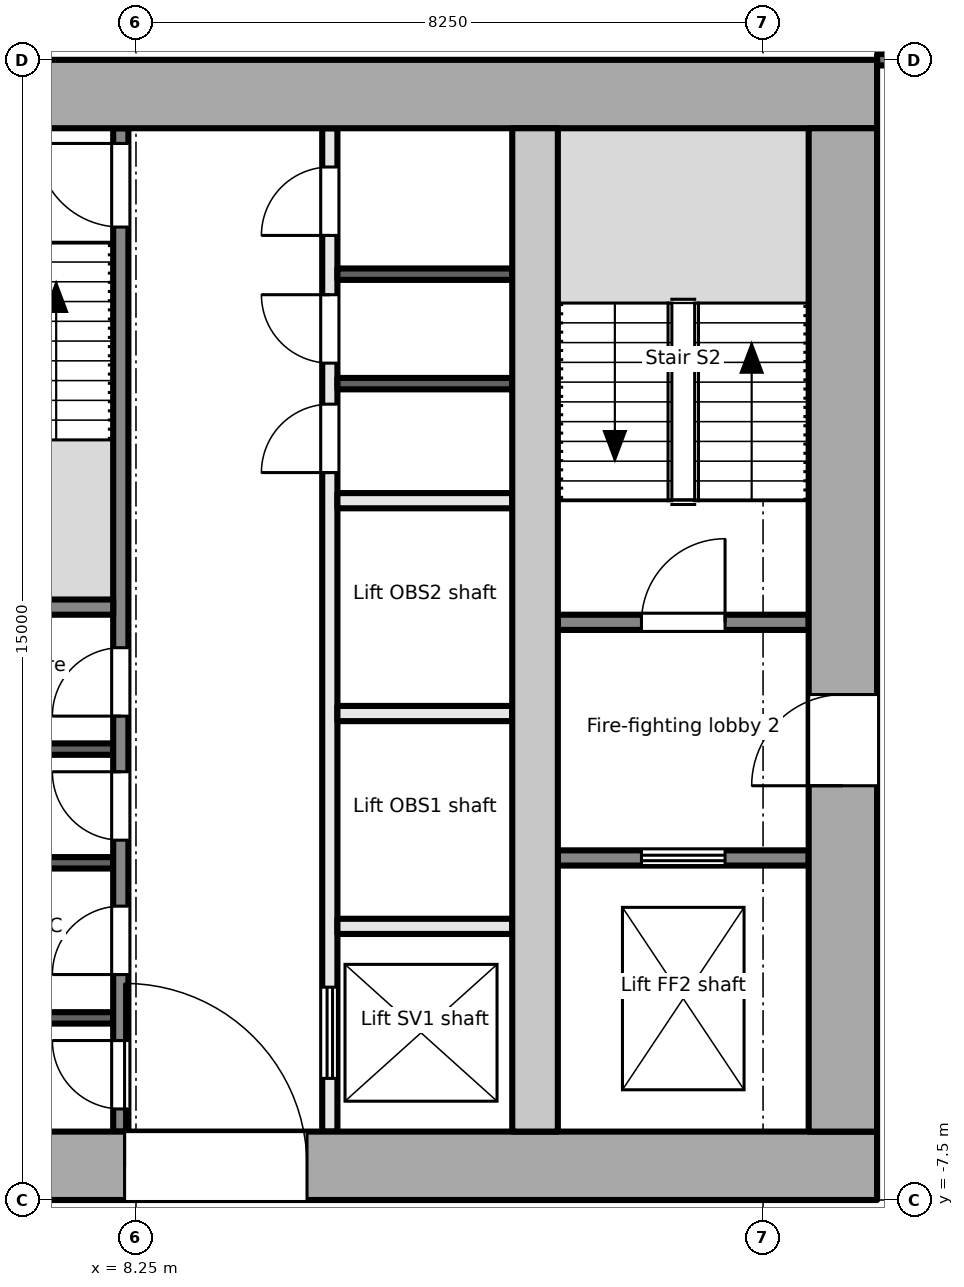
"""IFC4 building model, lengths in metres.
Left out: names, types, materials, properties, quantities, classifications, styles, units other than length and angle.
Written with IfcOpenShell. Run it as: python <this file> out.ifc"""

import sys

from ifc_helpers import new_model, si_unit, direction, frame, frame_2d, origin, place, context, subcontext, project, spatial, rectangle, extrude, element, fill, save


model = new_model("IFC4")
c1 = context("Model", 3, precision=1e-05, world=origin(), true_north=direction((0.0, 1.0)))
c2 = subcontext(c1, "Body", "Model", "MODEL_VIEW")
j1 = project(units=[si_unit("LENGTHUNIT", "METRE"), si_unit("PLANEANGLEUNIT", "RADIAN")], contexts=[c1])
p1 = place(None, origin())
s1 = spatial("IfcSite", under=j1, at=p1, CompositionType="ELEMENT")
p2 = place(p1, origin())
s2 = spatial("IfcBuilding", under=s1, at=p2, CompositionType="ELEMENT")
p3 = place(p2, frame((0.0, 0.0, 266.8)))
s3 = spatial("IfcBuildingStorey", under=s2, at=p3, CompositionType="ELEMENT", Elevation=266.8)
p4 = place(p3, frame((-18.0, -7.05, -0.2), z_axis=(0.0, 0.0, 1.0), x_axis=(1.0, 0.0, 0.0)))
e1 = element("IfcWall", 1, at=p4, inside=s3, PredefinedType="SHEAR", context=c2, shape_type="SweptSolid", body=[
    extrude(rectangle(XDim=36.0, YDim=0.9, at=frame_2d((18.0, 0.0))), origin(), (0.0, 0.0, 1.0), 3.9),
])
p5 = place(p4, frame((11.3, 0.0, 0.2)))
e2 = element("IfcOpeningElement", 2, at=p5, cuts=e1, PredefinedType="OPENING", context=c2, shape_type="SweptSolid", body=[
    extrude(rectangle(XDim=1.8, YDim=2.1, at=frame_2d((0.9, 1.05))), frame((0.0, 0.46, 0.0), z_axis=(0.0, -1.0, 0.0), x_axis=(1.0, 0.0, 0.0)), (0.0, 0.0, 1.0), 0.921),
])
p6 = place(p4, frame((16.8, 0.0, 0.2)))
e3 = element("IfcOpeningElement", 3, at=p6, cuts=e1, PredefinedType="OPENING", context=c2, shape_type="SweptSolid", body=[
    extrude(rectangle(XDim=2.4, YDim=2.1, at=frame_2d((1.2, 1.05))), frame((0.0, 0.46, 0.0), z_axis=(0.0, -1.0, 0.0), x_axis=(1.0, 0.0, 0.0)), (0.0, 0.0, 1.0), 0.921),
])
p7 = place(p4, frame((26.1, 0.0, 0.2)))
e4 = element("IfcOpeningElement", 4, at=p7, cuts=e1, PredefinedType="OPENING", context=c2, shape_type="SweptSolid", body=[
    extrude(rectangle(XDim=2.4, YDim=2.1, at=frame_2d((1.2, 1.05))), frame((0.0, 0.46, 0.0), z_axis=(0.0, -1.0, 0.0), x_axis=(1.0, 0.0, 0.0)), (0.0, 0.0, 1.0), 0.921),
])
p8 = place(p3, frame((-18.0, 7.05, -0.2), z_axis=(0.0, 0.0, 1.0), x_axis=(1.0, 0.0, 0.0)))
e5 = element("IfcWall", 5, at=p8, inside=s3, PredefinedType="SHEAR", context=c2, shape_type="SweptSolid", body=[
    extrude(rectangle(XDim=36.0, YDim=0.9, at=frame_2d((18.0, 0.0))), origin(), (0.0, 0.0, 1.0), 3.9),
])
p9 = place(p3, frame((17.55, -6.6, -0.2), z_axis=(0.0, 0.0, 1.0), x_axis=(0.0, 1.0, 0.0)))
e6 = element("IfcWall", 6, at=p9, inside=s3, PredefinedType="SHEAR", context=c2, shape_type="SweptSolid", body=[
    extrude(rectangle(XDim=13.2, YDim=0.9, at=frame_2d((6.6, 0.0))), origin(), (0.0, 0.0, 1.0), 3.9),
])
p10 = place(p9, frame((4.55, 0.0, 0.2)))
e7 = element("IfcOpeningElement", 7, at=p10, cuts=e6, PredefinedType="OPENING", context=c2, shape_type="SweptSolid", body=[
    extrude(rectangle(XDim=1.2, YDim=2.1, at=frame_2d((0.6, 1.05))), frame((0.0, 0.46, 0.0), z_axis=(0.0, -1.0, 0.0), x_axis=(1.0, 0.0, 0.0)), (0.0, 0.0, 1.0), 0.921),
])
p11 = place(p3, frame((13.5, -6.6, -0.2), z_axis=(0.0, 0.0, 1.0), x_axis=(0.0, 1.0, 0.0)))
e8 = element("IfcWall", 8, at=p11, inside=s3, PredefinedType="SHEAR", context=c2, shape_type="SweptSolid", body=[
    extrude(rectangle(XDim=13.2, YDim=0.6, at=frame_2d((6.6, 0.0))), origin(), (0.0, 0.0, 1.0), 3.9),
])
p12 = place(p3, frame((13.8, -3.0, 0.0), z_axis=(0.0, 0.0, 1.0), x_axis=(1.0, 0.0, 0.0)))
e9 = element("IfcWall", 9, at=p12, inside=s3, PredefinedType="PARTITIONING", context=c2, shape_type="SweptSolid", body=[
    extrude(rectangle(XDim=3.3, YDim=0.2, at=frame_2d((1.65, 0.0))), origin(), (0.0, 0.0, 1.0), 3.7),
])
p13 = place(p12, frame((1.1, 0.0, 0.0)))
e10 = element("IfcOpeningElement", 10, at=p13, cuts=e9, PredefinedType="OPENING", context=c2, shape_type="SweptSolid", body=[
    extrude(rectangle(XDim=1.1, YDim=2.1, at=frame_2d((0.55, 1.05))), frame((0.0, 0.111, 0.0), z_axis=(0.0, -1.0, 0.0), x_axis=(1.0, 0.0, 0.0)), (0.0, 0.0, 1.0), 0.221),
])
p14 = place(p3, frame((13.8, 0.1, 0.0), z_axis=(0.0, 0.0, 1.0), x_axis=(1.0, 0.0, 0.0)))
e11 = element("IfcWall", 11, at=p14, inside=s3, PredefinedType="PARTITIONING", context=c2, shape_type="SweptSolid", body=[
    extrude(rectangle(XDim=3.3, YDim=0.2, at=frame_2d((1.65, 0.0))), origin(), (0.0, 0.0, 1.0), 3.7),
])
p15 = place(p14, frame((1.1, 0.0, 0.0)))
e12 = element("IfcOpeningElement", 12, at=p15, cuts=e11, PredefinedType="OPENING", context=c2, shape_type="SweptSolid", body=[
    extrude(rectangle(XDim=1.1, YDim=2.1, at=frame_2d((0.55, 1.05))), frame((0.0, 0.111, 0.0), z_axis=(0.0, -1.0, 0.0), x_axis=(1.0, 0.0, 0.0)), (0.0, 0.0, 1.0), 0.221),
])
p16 = place(p3, frame((8.05, -6.6, 0.0), z_axis=(0.0, 0.0, 1.0), x_axis=(0.0, 1.0, 0.0)))
e13 = element("IfcWall", 13, at=p16, inside=s3, PredefinedType="PARTITIONING", context=c2, shape_type="SweptSolid", body=[
    extrude(rectangle(XDim=13.2, YDim=0.2, at=frame_2d((6.6, 0.0))), origin(), (0.0, 0.0, 1.0), 3.7),
])
p17 = place(p16, frame((0.298, 0.0, 0.0)))
e14 = element("IfcOpeningElement", 14, at=p17, cuts=e13, PredefinedType="OPENING", context=c2, shape_type="SweptSolid", body=[
    extrude(rectangle(XDim=0.9, YDim=2.1, at=frame_2d((0.45, 1.05))), frame((0.0, 0.111, 0.0), z_axis=(0.0, -1.0, 0.0), x_axis=(1.0, 0.0, 0.0)), (0.0, 0.0, 1.0), 0.221),
])
p18 = place(p16, frame((2.066, 0.0, 0.0)))
e15 = element("IfcOpeningElement", 15, at=p18, cuts=e13, PredefinedType="OPENING", context=c2, shape_type="SweptSolid", body=[
    extrude(rectangle(XDim=0.9, YDim=2.1, at=frame_2d((0.45, 1.05))), frame((0.0, 0.111, 0.0), z_axis=(0.0, -1.0, 0.0), x_axis=(1.0, 0.0, 0.0)), (0.0, 0.0, 1.0), 0.221),
])
p19 = place(p16, frame((3.834, 0.0, 0.0)))
e16 = element("IfcOpeningElement", 16, at=p19, cuts=e13, PredefinedType="OPENING", context=c2, shape_type="SweptSolid", body=[
    extrude(rectangle(XDim=0.9, YDim=2.1, at=frame_2d((0.45, 1.05))), frame((0.0, 0.111, 0.0), z_axis=(0.0, -1.0, 0.0), x_axis=(1.0, 0.0, 0.0)), (0.0, 0.0, 1.0), 0.221),
])
p20 = place(p16, frame((5.466, 0.0, 0.0)))
e17 = element("IfcOpeningElement", 17, at=p20, cuts=e13, PredefinedType="OPENING", context=c2, shape_type="SweptSolid", body=[
    extrude(rectangle(XDim=0.9, YDim=2.1, at=frame_2d((0.45, 1.05))), frame((0.0, 0.111, 0.0), z_axis=(0.0, -1.0, 0.0), x_axis=(1.0, 0.0, 0.0)), (0.0, 0.0, 1.0), 0.221),
])
p21 = place(p16, frame((11.9, 0.0, 0.0)))
e18 = element("IfcOpeningElement", 18, at=p21, cuts=e13, PredefinedType="OPENING", context=c2, shape_type="SweptSolid", body=[
    extrude(rectangle(XDim=1.1, YDim=2.1, at=frame_2d((0.55, 1.05))), frame((0.0, 0.111, 0.0), z_axis=(0.0, -1.0, 0.0), x_axis=(1.0, 0.0, 0.0)), (0.0, 0.0, 1.0), 0.221),
])
p22 = place(p3, frame((10.8, -6.6, 0.0), z_axis=(0.0, 0.0, 1.0), x_axis=(0.0, 1.0, 0.0)))
e19 = element("IfcWall", 19, at=p22, inside=s3, PredefinedType="PARTITIONING", context=c2, shape_type="SweptSolid", body=[
    extrude(rectangle(XDim=13.2, YDim=0.2, at=frame_2d((6.6, 0.0))), origin(), (0.0, 0.0, 1.0), 3.7),
])
p23 = place(p22, frame((0.7, 0.0, 0.0)))
e20 = element("IfcOpeningElement", 20, at=p23, cuts=e19, PredefinedType="OPENING", context=c2, shape_type="SweptSolid", body=[
    extrude(rectangle(XDim=1.2, YDim=2.1, at=frame_2d((0.6, 1.05))), frame((0.0, 0.111, 0.0), z_axis=(0.0, -1.0, 0.0), x_axis=(1.0, 0.0, 0.0)), (0.0, 0.0, 1.0), 0.221),
])
p24 = place(p22, frame((8.67, 0.0, 0.0)))
e21 = element("IfcOpeningElement", 21, at=p24, cuts=e19, PredefinedType="OPENING", context=c2, shape_type="SweptSolid", body=[
    extrude(rectangle(XDim=0.9, YDim=2.1, at=frame_2d((0.45, 1.05))), frame((0.0, 0.111, 0.0), z_axis=(0.0, -1.0, 0.0), x_axis=(1.0, 0.0, 0.0)), (0.0, 0.0, 1.0), 0.221),
])
p25 = place(p22, frame((10.11, 0.0, 0.0)))
e22 = element("IfcOpeningElement", 22, at=p25, cuts=e19, PredefinedType="OPENING", context=c2, shape_type="SweptSolid", body=[
    extrude(rectangle(XDim=0.9, YDim=2.1, at=frame_2d((0.45, 1.05))), frame((0.0, 0.111, 0.0), z_axis=(0.0, -1.0, 0.0), x_axis=(1.0, 0.0, 0.0)), (0.0, 0.0, 1.0), 0.221),
])
p26 = place(p22, frame((11.79, 0.0, 0.0)))
e23 = element("IfcOpeningElement", 23, at=p26, cuts=e19, PredefinedType="OPENING", context=c2, shape_type="SweptSolid", body=[
    extrude(rectangle(XDim=0.9, YDim=2.1, at=frame_2d((0.45, 1.05))), frame((0.0, 0.111, 0.0), z_axis=(0.0, -1.0, 0.0), x_axis=(1.0, 0.0, 0.0)), (0.0, 0.0, 1.0), 0.221),
])
p27 = place(p3, frame((4.8, 0.3, 0.0), z_axis=(0.0, 0.0, 1.0), x_axis=(1.0, 0.0, 0.0)))
e24 = element("IfcWall", 24, at=p27, inside=s3, PredefinedType="PARTITIONING", context=c2, shape_type="SweptSolid", body=[
    extrude(rectangle(XDim=3.15, YDim=0.2, at=frame_2d((1.575, 0.0))), origin(), (0.0, 0.0, 1.0), 3.7),
])
for number, where, z_axis, x_axis in (
    (25, (4.8, -5.104, 0.0), (0.0, 0.0, 1.0), (1.0, 0.0, 0.0)),
    (26, (4.8, -3.064, 0.0), (0.0, 0.0, 1.0), (1.0, 0.0, 0.0)),
    (27, (4.8, -1.568, 0.0), (0.0, 0.0, 1.0), (1.0, 0.0, 0.0)),
):
    element("IfcWall", number, at=place(p3, frame(where, z_axis=z_axis, x_axis=x_axis)), inside=s3, PredefinedType="PARTITIONING", context=c2, shape_type="SweptSolid", body=[
        extrude(rectangle(XDim=3.15, YDim=0.15, at=frame_2d((1.575, 0.0))), origin(), (0.0, 0.0, 1.0), 3.7),
    ])
for number, where, z_axis, x_axis in (
    (28, (10.9, -3.9, 0.0), (0.0, 0.0, 1.0), (1.0, 0.0, 0.0)),
    (29, (10.9, -1.1, 0.0), (0.0, 0.0, 1.0), (1.0, 0.0, 0.0)),
    (30, (10.9, 1.7, 0.0), (0.0, 0.0, 1.0), (1.0, 0.0, 0.0)),
):
    element("IfcWall", number, at=place(p3, frame(where, z_axis=z_axis, x_axis=x_axis)), inside=s3, PredefinedType="PARTITIONING", context=c2, shape_type="SweptSolid", body=[
        extrude(rectangle(XDim=2.3, YDim=0.2, at=frame_2d((1.15, 0.0))), origin(), (0.0, 0.0, 1.0), 3.7),
    ])
for number, where, z_axis, x_axis in (
    (31, (10.9, 3.24, 0.0), (0.0, 0.0, 1.0), (1.0, 0.0, 0.0)),
    (32, (10.9, 4.68, 0.0), (0.0, 0.0, 1.0), (1.0, 0.0, 0.0)),
):
    element("IfcWall", number, at=place(p3, frame(where, z_axis=z_axis, x_axis=x_axis)), inside=s3, PredefinedType="PARTITIONING", context=c2, shape_type="SweptSolid", body=[
        extrude(rectangle(XDim=2.3, YDim=0.15, at=frame_2d((1.15, 0.0))), origin(), (0.0, 0.0, 1.0), 3.7),
    ])
p28 = place(p3, frame((18.0, 7.501, 0.0), z_axis=(0.0, 0.0, 1.0), x_axis=(1.0, 0.0, 0.0)))
e33 = element("IfcWall", 33, at=p28, inside=s3, PredefinedType="PARTITIONING", context=c2, shape_type="SweptSolid", body=[
    extrude(rectangle(XDim=2.625, YDim=0.15, at=frame_2d((1.312, 0.0))), origin(), (0.0, 0.0, 1.0), 3.7),
])
p29 = place(p13, origin())
e34 = element("IfcDoor", 34, at=p29, inside=s3, OperationType="DOUBLE_DOOR_SLIDING", PredefinedType="DOOR", context=c2, shape_type="SweptSolid", body=[
    extrude(rectangle(XDim=1.1, YDim=2.1, at=frame_2d((0.55, 1.05))), frame((0.0, 0.025, 0.0), z_axis=(0.0, -1.0, 0.0), x_axis=(1.0, 0.0, 0.0)), (0.0, 0.0, 1.0), 0.05),
])
fill(e10, e34)
p30 = place(p10, origin())
e35 = element("IfcDoor", 35, at=p30, inside=s3, OperationType="SINGLE_SWING_LEFT", PredefinedType="DOOR", context=c2, shape_type="SweptSolid", body=[
    extrude(rectangle(XDim=1.2, YDim=2.1, at=frame_2d((0.6, 1.05))), frame((0.0, 0.025, 0.0), z_axis=(0.0, -1.0, 0.0), x_axis=(1.0, 0.0, 0.0)), (0.0, 0.0, 1.0), 0.05),
])
fill(e7, e35)
p31 = place(p15, origin())
e36 = element("IfcDoor", 36, at=p31, inside=s3, OperationType="SINGLE_SWING_RIGHT", PredefinedType="DOOR", context=c2, shape_type="SweptSolid", body=[
    extrude(rectangle(XDim=1.1, YDim=2.1, at=frame_2d((0.55, 1.05))), frame((0.0, 0.025, 0.0), z_axis=(0.0, -1.0, 0.0), x_axis=(1.0, 0.0, 0.0)), (0.0, 0.0, 1.0), 0.05),
])
fill(e12, e36)
p32 = place(p17, origin())
e37 = element("IfcDoor", 37, at=p32, inside=s3, OperationType="SINGLE_SWING_RIGHT", PredefinedType="DOOR", context=c2, shape_type="SweptSolid", body=[
    extrude(rectangle(XDim=0.9, YDim=2.1, at=frame_2d((0.45, 1.05))), frame((0.0, 0.025, 0.0), z_axis=(0.0, -1.0, 0.0), x_axis=(1.0, 0.0, 0.0)), (0.0, 0.0, 1.0), 0.05),
])
fill(e14, e37)
p33 = place(p18, origin())
e38 = element("IfcDoor", 38, at=p33, inside=s3, OperationType="SINGLE_SWING_LEFT", PredefinedType="DOOR", context=c2, shape_type="SweptSolid", body=[
    extrude(rectangle(XDim=0.9, YDim=2.1, at=frame_2d((0.45, 1.05))), frame((0.0, 0.025, 0.0), z_axis=(0.0, -1.0, 0.0), x_axis=(1.0, 0.0, 0.0)), (0.0, 0.0, 1.0), 0.05),
])
fill(e15, e38)
p34 = place(p19, origin())
e39 = element("IfcDoor", 39, at=p34, inside=s3, OperationType="SINGLE_SWING_RIGHT", PredefinedType="DOOR", context=c2, shape_type="SweptSolid", body=[
    extrude(rectangle(XDim=0.9, YDim=2.1, at=frame_2d((0.45, 1.05))), frame((0.0, 0.025, 0.0), z_axis=(0.0, -1.0, 0.0), x_axis=(1.0, 0.0, 0.0)), (0.0, 0.0, 1.0), 0.05),
])
fill(e16, e39)
p35 = place(p20, origin())
e40 = element("IfcDoor", 40, at=p35, inside=s3, OperationType="SINGLE_SWING_LEFT", PredefinedType="DOOR", context=c2, shape_type="SweptSolid", body=[
    extrude(rectangle(XDim=0.9, YDim=2.1, at=frame_2d((0.45, 1.05))), frame((0.0, 0.025, 0.0), z_axis=(0.0, -1.0, 0.0), x_axis=(1.0, 0.0, 0.0)), (0.0, 0.0, 1.0), 0.05),
])
fill(e17, e40)
p36 = place(p21, origin())
e41 = element("IfcDoor", 41, at=p36, inside=s3, OperationType="SINGLE_SWING_RIGHT", PredefinedType="DOOR", context=c2, shape_type="SweptSolid", body=[
    extrude(rectangle(XDim=1.1, YDim=2.1, at=frame_2d((0.55, 1.05))), frame((0.0, 0.025, 0.0), z_axis=(0.0, -1.0, 0.0), x_axis=(1.0, 0.0, 0.0)), (0.0, 0.0, 1.0), 0.05),
])
fill(e18, e41)
p37 = place(p7, origin())
e42 = element("IfcDoor", 42, at=p37, inside=s3, OperationType="DOUBLE_DOOR_DOUBLE_SWING", PredefinedType="DOOR", context=c2, shape_type="SweptSolid", body=[
    extrude(rectangle(XDim=2.4, YDim=2.1, at=frame_2d((1.2, 1.05))), frame((0.0, 0.025, 0.0), z_axis=(0.0, -1.0, 0.0), x_axis=(1.0, 0.0, 0.0)), (0.0, 0.0, 1.0), 0.05),
])
fill(e4, e42)
p38 = place(p23, origin())
e43 = element("IfcDoor", 43, at=p38, inside=s3, OperationType="DOUBLE_DOOR_SLIDING", PredefinedType="DOOR", context=c2, shape_type="SweptSolid", body=[
    extrude(rectangle(XDim=1.2, YDim=2.1, at=frame_2d((0.6, 1.05))), frame((0.0, 0.025, 0.0), z_axis=(0.0, -1.0, 0.0), x_axis=(1.0, 0.0, 0.0)), (0.0, 0.0, 1.0), 0.05),
])
fill(e20, e43)
p39 = place(p24, origin())
e44 = element("IfcDoor", 44, at=p39, inside=s3, OperationType="SINGLE_SWING_LEFT", PredefinedType="DOOR", context=c2, shape_type="SweptSolid", body=[
    extrude(rectangle(XDim=0.9, YDim=2.1, at=frame_2d((0.45, 1.05))), frame((0.0, 0.025, 0.0), z_axis=(0.0, -1.0, 0.0), x_axis=(1.0, 0.0, 0.0)), (0.0, 0.0, 1.0), 0.05),
])
fill(e21, e44)
p40 = place(p25, origin())
e45 = element("IfcDoor", 45, at=p40, inside=s3, OperationType="SINGLE_SWING_RIGHT", PredefinedType="DOOR", context=c2, shape_type="SweptSolid", body=[
    extrude(rectangle(XDim=0.9, YDim=2.1, at=frame_2d((0.45, 1.05))), frame((0.0, 0.025, 0.0), z_axis=(0.0, -1.0, 0.0), x_axis=(1.0, 0.0, 0.0)), (0.0, 0.0, 1.0), 0.05),
])
fill(e22, e45)
p41 = place(p26, origin())
e46 = element("IfcDoor", 46, at=p41, inside=s3, OperationType="SINGLE_SWING_LEFT", PredefinedType="DOOR", context=c2, shape_type="SweptSolid", body=[
    extrude(rectangle(XDim=0.9, YDim=2.1, at=frame_2d((0.45, 1.05))), frame((0.0, 0.025, 0.0), z_axis=(0.0, -1.0, 0.0), x_axis=(1.0, 0.0, 0.0)), (0.0, 0.0, 1.0), 0.05),
])
fill(e23, e46)
save(model, sys.argv[1])
